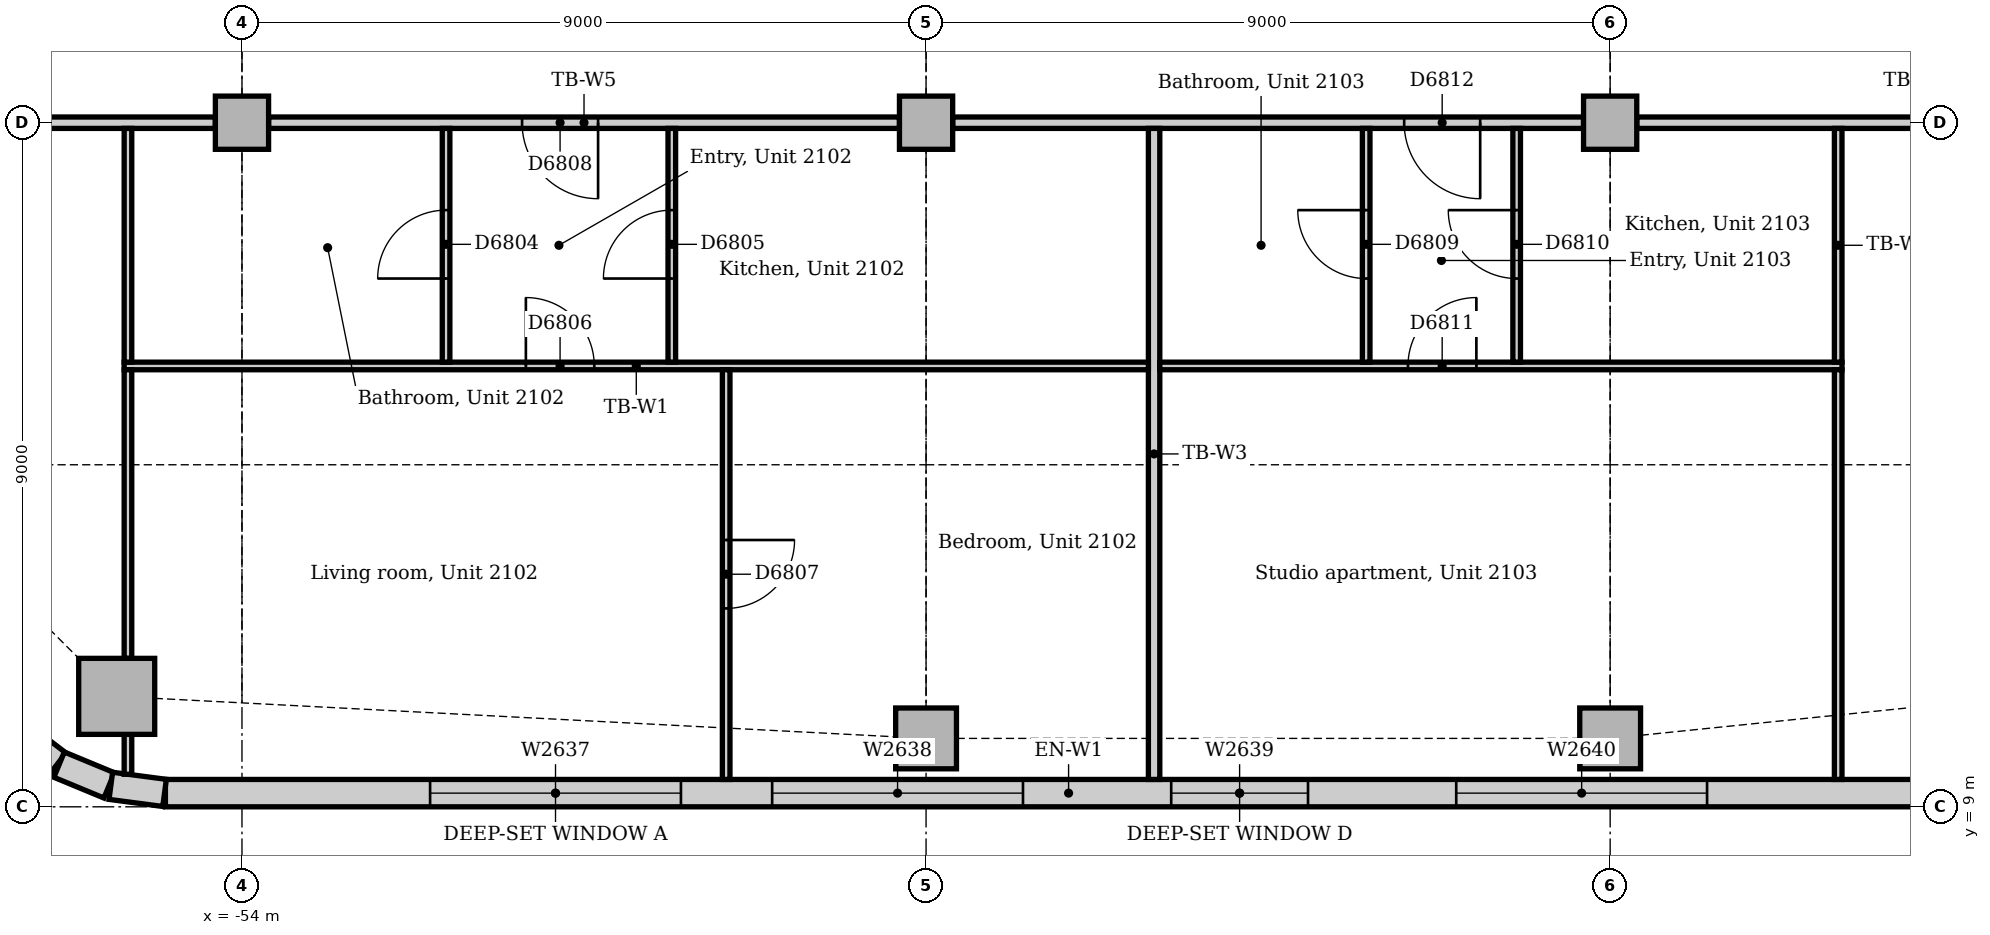
"""IFC4 building model, lengths in metres.
Left out: names, types, materials, properties, quantities, classifications, styles, units other than length and angle.
Written with IfcOpenShell. Run it as: python <this file> out.ifc"""

import sys

from ifc_helpers import new_model, si_unit, direction, frame, frame_2d, origin, origin_2d, place, context, subcontext, project, spatial, rectangle, extrude, element, fill, save


model = new_model("IFC4")
c1 = context("Model", 3, precision=1e-05, world=origin(), true_north=direction((0.0, 1.0)))
c2 = subcontext(c1, "Body", "Model", "MODEL_VIEW")
j1 = project(units=[si_unit("LENGTHUNIT", "METRE"), si_unit("PLANEANGLEUNIT", "RADIAN")], contexts=[c1])
p1 = place(None, origin())
s1 = spatial("IfcSite", under=j1, at=p1, CompositionType="ELEMENT")
p2 = place(p1, origin())
s2 = spatial("IfcBuilding", under=s1, at=p2, CompositionType="ELEMENT")
p3 = place(p2, frame((0.0, 0.0, 91.0)))
s3 = spatial("IfcBuildingStorey", under=s2, at=p3, CompositionType="ELEMENT", Elevation=91.0)
p4 = place(p3, frame((-55.648, 10.453, 0.0), z_axis=(0.0, 0.0, 1.0), x_axis=(1.0, 0.0, 0.0)))
e1 = element("IfcColumn", 1, at=p4, inside=s3, PredefinedType="COLUMN", context=c2, shape_type="SweptSolid", body=[
    extrude(rectangle(XDim=1.0, YDim=1.0, at=origin_2d()), origin(), (0.0, 0.0, 1.0), 3.7),
])
for number, where, z_axis, x_axis in (
    (2, (-45.0, 9.9, 0.0), (0.0, 0.0, 1.0), (1.0, 0.0, 0.0)),
    (3, (-36.0, 9.9, 0.0), (0.0, 0.0, 1.0), (1.0, 0.0, 0.0)),
):
    element("IfcColumn", number, at=place(p3, frame(where, z_axis=z_axis, x_axis=x_axis)), inside=s3, PredefinedType="COLUMN", context=c2, shape_type="SweptSolid", body=[
        extrude(rectangle(XDim=0.8, YDim=0.8, at=origin_2d()), origin(), (0.0, 0.0, 1.0), 3.7),
    ])
for number, where, z_axis, x_axis in (
    (4, (-54.0, 18.0, 0.0), (0.0, 0.0, 1.0), (1.0, 0.0, 0.0)),
    (5, (-45.0, 18.0, 0.0), (0.0, 0.0, 1.0), (1.0, 0.0, 0.0)),
    (6, (-36.0, 18.0, 0.0), (0.0, 0.0, 1.0), (1.0, 0.0, 0.0)),
):
    element("IfcColumn", number, at=place(p3, frame(where, z_axis=z_axis, x_axis=x_axis)), inside=s3, PredefinedType="COLUMN", context=c2, shape_type="SweptSolid", body=[
        extrude(rectangle(XDim=0.7, YDim=0.7, at=origin_2d()), origin(), (0.0, 0.0, 1.0), 3.7),
    ])
p5 = place(p3, frame((-55.007, 9.18, 0.0), z_axis=(0.0, 0.0, 1.0), x_axis=(1.0, 0.0, 0.0)))
e7 = element("IfcWall", 7, at=p5, inside=s3, PredefinedType="STANDARD", context=c2, shape_type="SweptSolid", body=[
    extrude(rectangle(XDim=23.765, YDim=0.36, at=frame_2d((11.882, 0.0))), origin(), (0.0, 0.0, 1.0), 3.7),
])
p6 = place(p5, frame((3.482, 0.0, 0.9)))
e8 = element("IfcOpeningElement", 8, at=p6, cuts=e7, PredefinedType="OPENING", context=c2, shape_type="SweptSolid", body=[
    extrude(rectangle(XDim=3.3, YDim=1.6, at=frame_2d((1.65, 0.8))), frame((0.0, 0.19, 0.0), z_axis=(0.0, -1.0, 0.0), x_axis=(1.0, 0.0, 0.0)), (0.0, 0.0, 1.0), 0.38),
])
p7 = place(p5, frame((7.982, 0.0, 0.9)))
e9 = element("IfcOpeningElement", 9, at=p7, cuts=e7, PredefinedType="OPENING", context=c2, shape_type="SweptSolid", body=[
    extrude(rectangle(XDim=3.3, YDim=1.6, at=frame_2d((1.65, 0.8))), frame((0.0, 0.19, 0.0), z_axis=(0.0, -1.0, 0.0), x_axis=(1.0, 0.0, 0.0)), (0.0, 0.0, 1.0), 0.38),
])
p8 = place(p5, frame((13.232, 0.0, 0.9)))
e10 = element("IfcOpeningElement", 10, at=p8, cuts=e7, PredefinedType="OPENING", context=c2, shape_type="SweptSolid", body=[
    extrude(rectangle(XDim=1.8, YDim=1.6, at=frame_2d((0.9, 0.8))), frame((0.0, 0.19, 0.0), z_axis=(0.0, -1.0, 0.0), x_axis=(1.0, 0.0, 0.0)), (0.0, 0.0, 1.0), 0.38),
])
p9 = place(p5, frame((16.982, 0.0, 0.9)))
e11 = element("IfcOpeningElement", 11, at=p9, cuts=e7, PredefinedType="OPENING", context=c2, shape_type="SweptSolid", body=[
    extrude(rectangle(XDim=3.3, YDim=1.6, at=frame_2d((1.65, 0.8))), frame((0.0, 0.19, 0.0), z_axis=(0.0, -1.0, 0.0), x_axis=(1.0, 0.0, 0.0)), (0.0, 0.0, 1.0), 0.38),
])
p10 = place(p3, frame((-56.991, 10.0, 0.0), z_axis=(0.0, 0.0, 1.0), x_axis=(0.793321924995, -0.608802368033, 0.0)))
e12 = element("IfcWall", 12, at=p10, inside=s3, PredefinedType="STANDARD", context=c2, shape_type="SweptSolid", body=[
    extrude(rectangle(XDim=0.713, YDim=0.36, at=frame_2d((0.357, 0.0))), origin(), (0.0, 0.0, 1.0), 3.7),
])
for number, where, z_axis, x_axis in (
    (13, (-56.406, 9.555, 0.0), (0.0, 0.0, 1.0), (0.924, -0.383, 0.0)),
    (14, (-55.726, 9.276, 0.0), (0.0, 0.0, 1.0), (0.991, -0.131, 0.0)),
):
    element("IfcWall", number, at=place(p3, frame(where, z_axis=z_axis, x_axis=x_axis)), inside=s3, PredefinedType="STANDARD", context=c2, shape_type="SweptSolid", body=[
        extrude(rectangle(XDim=0.713, YDim=0.36, at=frame_2d((0.356, 0.0))), origin(), (0.0, 0.0, 1.0), 3.7),
    ])
p11 = place(p3, frame((-35.65, 18.0, 0.0), z_axis=(0.0, 0.0, 1.0), x_axis=(1.0, 0.0, 0.0)))
e15 = element("IfcWall", 15, at=p11, inside=s3, PredefinedType="PARTITIONING", context=c2, shape_type="SweptSolid", body=[
    extrude(rectangle(XDim=7.35, YDim=0.15, at=frame_2d((3.675, 0.0))), origin(), (0.0, 0.0, 1.0), 3.008),
])
p12 = place(p11, frame((4.45, 0.0, 0.0)))
e16 = element("IfcOpeningElement", 16, at=p12, cuts=e15, PredefinedType="OPENING", context=c2, shape_type="SweptSolid", body=[
    extrude(rectangle(XDim=0.9, YDim=2.1, at=frame_2d((0.45, 1.05))), frame((0.0, 0.085, 0.0), z_axis=(0.0, -1.0, 0.0), x_axis=(1.0, 0.0, 0.0)), (0.0, 0.0, 1.0), 0.17),
])
p13 = place(p3, frame((-44.65, 18.0, 0.0), z_axis=(0.0, 0.0, 1.0), x_axis=(1.0, 0.0, 0.0)))
e17 = element("IfcWall", 17, at=p13, inside=s3, PredefinedType="PARTITIONING", context=c2, shape_type="SweptSolid", body=[
    extrude(rectangle(XDim=8.3, YDim=0.15, at=frame_2d((4.15, 0.0))), origin(), (0.0, 0.0, 1.0), 3.008),
])
p14 = place(p13, frame((5.94, 0.0, 0.0)))
e18 = element("IfcOpeningElement", 18, at=p14, cuts=e17, PredefinedType="OPENING", context=c2, shape_type="SweptSolid", body=[
    extrude(rectangle(XDim=1.0, YDim=2.1, at=frame_2d((0.5, 1.05))), frame((0.0, 0.085, 0.0), z_axis=(0.0, -1.0, 0.0), x_axis=(1.0, 0.0, 0.0)), (0.0, 0.0, 1.0), 0.17),
])
p15 = place(p3, frame((-53.65, 18.0, 0.0), z_axis=(0.0, 0.0, 1.0), x_axis=(1.0, 0.0, 0.0)))
e19 = element("IfcWall", 19, at=p15, inside=s3, PredefinedType="PARTITIONING", context=c2, shape_type="SweptSolid", body=[
    extrude(rectangle(XDim=8.3, YDim=0.15, at=frame_2d((4.15, 0.0))), origin(), (0.0, 0.0, 1.0), 3.008),
])
p16 = place(p15, frame((3.335, 0.0, 0.0)))
e20 = element("IfcOpeningElement", 20, at=p16, cuts=e19, PredefinedType="OPENING", context=c2, shape_type="SweptSolid", body=[
    extrude(rectangle(XDim=1.0, YDim=2.1, at=frame_2d((0.5, 1.05))), frame((0.0, 0.085, 0.0), z_axis=(0.0, -1.0, 0.0), x_axis=(1.0, 0.0, 0.0)), (0.0, 0.0, 1.0), 0.17),
])
p17 = place(p3, frame((-64.596, 18.0, 0.0), z_axis=(0.0, 0.0, 1.0), x_axis=(1.0, 0.0, 0.0)))
e21 = element("IfcWall", 21, at=p17, inside=s3, PredefinedType="PARTITIONING", context=c2, shape_type="SweptSolid", body=[
    extrude(rectangle(XDim=10.246, YDim=0.15, at=frame_2d((5.123, 0.0))), origin(), (0.0, 0.0, 1.0), 3.008),
])
p18 = place(p17, frame((4.15, 0.0, 0.0)))
e22 = element("IfcOpeningElement", 22, at=p18, cuts=e21, PredefinedType="OPENING", context=c2, shape_type="SweptSolid", body=[
    extrude(rectangle(XDim=0.9, YDim=2.1, at=frame_2d((0.45, 1.05))), frame((0.0, 0.085, 0.0), z_axis=(0.0, -1.0, 0.0), x_axis=(1.0, 0.0, 0.0)), (0.0, 0.0, 1.0), 0.17),
])
p19 = place(p3, frame((-42.0, 9.36, 0.0), z_axis=(0.0, 0.0, 1.0), x_axis=(0.0, 1.0, 0.0)))
e23 = element("IfcWall", 23, at=p19, inside=s3, PredefinedType="PARTITIONING", context=c2, shape_type="SweptSolid", body=[
    extrude(rectangle(XDim=8.565, YDim=0.15, at=frame_2d((4.282, 0.0))), origin(), (0.0, 0.0, 1.0), 3.7),
])
p20 = place(p3, frame((-55.55, 14.8, 0.0), z_axis=(0.0, 0.0, 1.0), x_axis=(1.0, 0.0, 0.0)))
e24 = element("IfcWall", 24, at=p20, inside=s3, PredefinedType="PARTITIONING", context=c2, shape_type="SweptSolid", body=[
    extrude(rectangle(XDim=13.475, YDim=0.1, at=frame_2d((6.737, 0.0))), origin(), (0.0, 0.0, 1.0), 3.7),
])
p21 = place(p20, frame((5.285, 0.0, 0.0)))
e25 = element("IfcOpeningElement", 25, at=p21, cuts=e24, PredefinedType="OPENING", context=c2, shape_type="SweptSolid", body=[
    extrude(rectangle(XDim=0.9, YDim=2.1, at=frame_2d((0.45, 1.05))), frame((0.0, 0.06, 0.0), z_axis=(0.0, -1.0, 0.0), x_axis=(1.0, 0.0, 0.0)), (0.0, 0.0, 1.0), 0.12),
])
p22 = place(p3, frame((-41.925, 14.8, 0.0), z_axis=(0.0, 0.0, 1.0), x_axis=(1.0, 0.0, 0.0)))
e26 = element("IfcWall", 26, at=p22, inside=s3, PredefinedType="PARTITIONING", context=c2, shape_type="SweptSolid", body=[
    extrude(rectangle(XDim=8.975, YDim=0.1, at=frame_2d((4.487, 0.0))), origin(), (0.0, 0.0, 1.0), 3.7),
])
p23 = place(p22, frame((3.265, 0.0, 0.0)))
e27 = element("IfcOpeningElement", 27, at=p23, cuts=e26, PredefinedType="OPENING", context=c2, shape_type="SweptSolid", body=[
    extrude(rectangle(XDim=0.9, YDim=2.1, at=frame_2d((0.45, 1.05))), frame((0.0, 0.06, 0.0), z_axis=(0.0, -1.0, 0.0), x_axis=(1.0, 0.0, 0.0)), (0.0, 0.0, 1.0), 0.12),
])
p24 = place(p3, frame((-33.0, 14.85, 0.0), z_axis=(0.0, 0.0, 1.0), x_axis=(0.0, 1.0, 0.0)))
e28 = element("IfcWall", 28, at=p24, inside=s3, PredefinedType="PARTITIONING", context=c2, shape_type="SweptSolid", body=[
    extrude(rectangle(XDim=3.075, YDim=0.1, at=frame_2d((1.538, 0.0))), origin(), (0.0, 0.0, 1.0), 3.7),
])
p25 = place(p3, frame((-33.0, 9.36, 0.0), z_axis=(0.0, 0.0, 1.0), x_axis=(0.0, 1.0, 0.0)))
e29 = element("IfcWall", 29, at=p25, inside=s3, PredefinedType="PARTITIONING", context=c2, shape_type="SweptSolid", body=[
    extrude(rectangle(XDim=5.39, YDim=0.1, at=frame_2d((2.695, 0.0))), origin(), (0.0, 0.0, 1.0), 3.7),
])
p26 = place(p3, frame((-55.5, 14.85, 0.0), z_axis=(0.0, 0.0, 1.0), x_axis=(0.0, 1.0, 0.0)))
e30 = element("IfcWall", 30, at=p26, inside=s3, PredefinedType="PARTITIONING", context=c2, shape_type="SweptSolid", body=[
    extrude(rectangle(XDim=3.075, YDim=0.1, at=frame_2d((1.538, 0.0))), origin(), (0.0, 0.0, 1.0), 3.7),
])
p27 = place(p3, frame((-55.5, 10.953, 0.0), z_axis=(0.0, 0.0, 1.0), x_axis=(0.0, 1.0, 0.0)))
e31 = element("IfcWall", 31, at=p27, inside=s3, PredefinedType="PARTITIONING", context=c2, shape_type="SweptSolid", body=[
    extrude(rectangle(XDim=3.797, YDim=0.1, at=frame_2d((1.898, 0.0))), origin(), (0.0, 0.0, 1.0), 3.7),
])
p28 = place(p3, frame((-55.5, 9.428, 0.0), z_axis=(0.0, 0.0, 1.0), x_axis=(0.0, 1.0, 0.0)))
e32 = element("IfcWall", 32, at=p28, inside=s3, PredefinedType="PARTITIONING", context=c2, shape_type="SweptSolid", body=[
    extrude(rectangle(XDim=0.525, YDim=0.1, at=frame_2d((0.263, 0.0))), origin(), (0.0, 0.0, 1.0), 3.7),
])
p29 = place(p3, frame((-47.63, 9.36, 0.0), z_axis=(0.0, 0.0, 1.0), x_axis=(0.0, 1.0, 0.0)))
e33 = element("IfcWall", 33, at=p29, inside=s3, PredefinedType="PARTITIONING", context=c2, shape_type="SweptSolid", body=[
    extrude(rectangle(XDim=5.39, YDim=0.1, at=frame_2d((2.695, 0.0))), origin(), (0.0, 0.0, 1.0), 3.7),
])
p30 = place(p29, frame((2.25, 0.0, 0.0)))
e34 = element("IfcOpeningElement", 34, at=p30, cuts=e33, PredefinedType="OPENING", context=c2, shape_type="SweptSolid", body=[
    extrude(rectangle(XDim=0.9, YDim=2.1, at=frame_2d((0.45, 1.05))), frame((0.0, 0.06, 0.0), z_axis=(0.0, -1.0, 0.0), x_axis=(1.0, 0.0, 0.0)), (0.0, 0.0, 1.0), 0.12),
])
p31 = place(p3, frame((-51.315, 14.85, 0.0), z_axis=(0.0, 0.0, 1.0), x_axis=(0.0, 1.0, 0.0)))
e35 = element("IfcWall", 35, at=p31, inside=s3, PredefinedType="PARTITIONING", context=c2, shape_type="SweptSolid", body=[
    extrude(rectangle(XDim=3.075, YDim=0.1, at=frame_2d((1.538, 0.0))), origin(), (0.0, 0.0, 1.0), 3.7),
])
p32 = place(p31, frame((1.1, 0.0, 0.0)))
e36 = element("IfcOpeningElement", 36, at=p32, cuts=e35, PredefinedType="OPENING", context=c2, shape_type="SweptSolid", body=[
    extrude(rectangle(XDim=0.9, YDim=2.1, at=frame_2d((0.45, 1.05))), frame((0.0, 0.06, 0.0), z_axis=(0.0, -1.0, 0.0), x_axis=(1.0, 0.0, 0.0)), (0.0, 0.0, 1.0), 0.12),
])
p33 = place(p3, frame((-48.345, 14.85, 0.0), z_axis=(0.0, 0.0, 1.0), x_axis=(0.0, 1.0, 0.0)))
e37 = element("IfcWall", 37, at=p33, inside=s3, PredefinedType="PARTITIONING", context=c2, shape_type="SweptSolid", body=[
    extrude(rectangle(XDim=3.075, YDim=0.1, at=frame_2d((1.538, 0.0))), origin(), (0.0, 0.0, 1.0), 3.7),
])
p34 = place(p33, frame((1.1, 0.0, 0.0)))
e38 = element("IfcOpeningElement", 38, at=p34, cuts=e37, PredefinedType="OPENING", context=c2, shape_type="SweptSolid", body=[
    extrude(rectangle(XDim=0.9, YDim=2.1, at=frame_2d((0.45, 1.05))), frame((0.0, 0.06, 0.0), z_axis=(0.0, -1.0, 0.0), x_axis=(1.0, 0.0, 0.0)), (0.0, 0.0, 1.0), 0.12),
])
p35 = place(p3, frame((-39.21, 14.85, 0.0), z_axis=(0.0, 0.0, 1.0), x_axis=(0.0, 1.0, 0.0)))
e39 = element("IfcWall", 39, at=p35, inside=s3, PredefinedType="PARTITIONING", context=c2, shape_type="SweptSolid", body=[
    extrude(rectangle(XDim=3.075, YDim=0.1, at=frame_2d((1.538, 0.0))), origin(), (0.0, 0.0, 1.0), 3.7),
])
p36 = place(p35, frame((1.1, 0.0, 0.0)))
e40 = element("IfcOpeningElement", 40, at=p36, cuts=e39, PredefinedType="OPENING", context=c2, shape_type="SweptSolid", body=[
    extrude(rectangle(XDim=0.9, YDim=2.1, at=frame_2d((0.45, 1.05))), frame((0.0, 0.06, 0.0), z_axis=(0.0, -1.0, 0.0), x_axis=(1.0, 0.0, 0.0)), (0.0, 0.0, 1.0), 0.12),
])
p37 = place(p3, frame((-37.23, 14.85, 0.0), z_axis=(0.0, 0.0, 1.0), x_axis=(0.0, 1.0, 0.0)))
e41 = element("IfcWall", 41, at=p37, inside=s3, PredefinedType="PARTITIONING", context=c2, shape_type="SweptSolid", body=[
    extrude(rectangle(XDim=3.075, YDim=0.1, at=frame_2d((1.538, 0.0))), origin(), (0.0, 0.0, 1.0), 3.7),
])
p38 = place(p37, frame((1.1, 0.0, 0.0)))
e42 = element("IfcOpeningElement", 42, at=p38, cuts=e41, PredefinedType="OPENING", context=c2, shape_type="SweptSolid", body=[
    extrude(rectangle(XDim=0.9, YDim=2.1, at=frame_2d((0.45, 1.05))), frame((0.0, 0.06, 0.0), z_axis=(0.0, -1.0, 0.0), x_axis=(1.0, 0.0, 0.0)), (0.0, 0.0, 1.0), 0.12),
])
p39 = place(p6, origin())
e43 = element("IfcWindow", 43, at=p39, inside=s3, PartitioningType="SINGLE_PANEL", PredefinedType="WINDOW", context=c2, shape_type="SweptSolid", body=[
    extrude(rectangle(XDim=3.3, YDim=1.6, at=frame_2d((1.65, 0.8))), frame((0.0, 0.13, 0.0), z_axis=(0.0, -1.0, 0.0), x_axis=(1.0, 0.0, 0.0)), (0.0, 0.0, 1.0), 0.06),
])
fill(e8, e43)
p40 = place(p7, origin())
e44 = element("IfcWindow", 44, at=p40, inside=s3, PartitioningType="SINGLE_PANEL", PredefinedType="WINDOW", context=c2, shape_type="SweptSolid", body=[
    extrude(rectangle(XDim=3.3, YDim=1.6, at=frame_2d((1.65, 0.8))), frame((0.0, 0.13, 0.0), z_axis=(0.0, -1.0, 0.0), x_axis=(1.0, 0.0, 0.0)), (0.0, 0.0, 1.0), 0.06),
])
fill(e9, e44)
p41 = place(p8, origin())
e45 = element("IfcWindow", 45, at=p41, inside=s3, PartitioningType="SINGLE_PANEL", PredefinedType="WINDOW", context=c2, shape_type="SweptSolid", body=[
    extrude(rectangle(XDim=1.8, YDim=1.6, at=frame_2d((0.9, 0.8))), frame((0.0, 0.13, 0.0), z_axis=(0.0, -1.0, 0.0), x_axis=(1.0, 0.0, 0.0)), (0.0, 0.0, 1.0), 0.06),
])
fill(e10, e45)
p42 = place(p9, origin())
e46 = element("IfcWindow", 46, at=p42, inside=s3, PartitioningType="SINGLE_PANEL", PredefinedType="WINDOW", context=c2, shape_type="SweptSolid", body=[
    extrude(rectangle(XDim=3.3, YDim=1.6, at=frame_2d((1.65, 0.8))), frame((0.0, 0.13, 0.0), z_axis=(0.0, -1.0, 0.0), x_axis=(1.0, 0.0, 0.0)), (0.0, 0.0, 1.0), 0.06),
])
fill(e11, e46)
p43 = place(p32, origin())
e47 = element("IfcDoor", 47, at=p43, inside=s3, OperationType="SINGLE_SWING_LEFT", PredefinedType="DOOR", context=c2, shape_type="SweptSolid", body=[
    extrude(rectangle(XDim=0.9, YDim=2.1, at=frame_2d((0.45, 1.05))), frame((0.0, 0.025, 0.0), z_axis=(0.0, -1.0, 0.0), x_axis=(1.0, 0.0, 0.0)), (0.0, 0.0, 1.0), 0.05),
])
fill(e36, e47)
p44 = place(p34, origin())
e48 = element("IfcDoor", 48, at=p44, inside=s3, OperationType="SINGLE_SWING_LEFT", PredefinedType="DOOR", context=c2, shape_type="SweptSolid", body=[
    extrude(rectangle(XDim=0.9, YDim=2.1, at=frame_2d((0.45, 1.05))), frame((0.0, 0.025, 0.0), z_axis=(0.0, -1.0, 0.0), x_axis=(1.0, 0.0, 0.0)), (0.0, 0.0, 1.0), 0.05),
])
fill(e38, e48)
p45 = place(p21, origin())
e49 = element("IfcDoor", 49, at=p45, inside=s3, OperationType="SINGLE_SWING_LEFT", PredefinedType="DOOR", context=c2, shape_type="SweptSolid", body=[
    extrude(rectangle(XDim=0.9, YDim=2.1, at=frame_2d((0.45, 1.05))), frame((0.0, 0.025, 0.0), z_axis=(0.0, -1.0, 0.0), x_axis=(1.0, 0.0, 0.0)), (0.0, 0.0, 1.0), 0.05),
])
fill(e25, e49)
p46 = place(p30, frame((0.9, 0.0, 0.0), z_axis=(0.0, 0.0, 1.0), x_axis=(-1.0, 0.0, 0.0)))
e50 = element("IfcDoor", 50, at=p46, inside=s3, OperationType="SINGLE_SWING_LEFT", PredefinedType="DOOR", context=c2, shape_type="SweptSolid", body=[
    extrude(rectangle(XDim=0.9, YDim=2.1, at=frame_2d((0.45, 1.05))), frame((0.0, 0.025, 0.0), z_axis=(0.0, -1.0, 0.0), x_axis=(1.0, 0.0, 0.0)), (0.0, 0.0, 1.0), 0.05),
])
fill(e34, e50)
p47 = place(p16, frame((1.0, 0.0, 0.0), z_axis=(0.0, 0.0, 1.0), x_axis=(-1.0, 0.0, 0.0)))
e51 = element("IfcDoor", 51, at=p47, inside=s3, OperationType="SINGLE_SWING_LEFT", PredefinedType="DOOR", context=c2, shape_type="SweptSolid", body=[
    extrude(rectangle(XDim=1.0, YDim=2.1, at=frame_2d((0.5, 1.05))), frame((0.0, 0.025, 0.0), z_axis=(0.0, -1.0, 0.0), x_axis=(1.0, 0.0, 0.0)), (0.0, 0.0, 1.0), 0.05),
])
fill(e20, e51)
p48 = place(p36, origin())
e52 = element("IfcDoor", 52, at=p48, inside=s3, OperationType="SINGLE_SWING_RIGHT", PredefinedType="DOOR", context=c2, shape_type="SweptSolid", body=[
    extrude(rectangle(XDim=0.9, YDim=2.1, at=frame_2d((0.45, 1.05))), frame((0.0, 0.025, 0.0), z_axis=(0.0, -1.0, 0.0), x_axis=(1.0, 0.0, 0.0)), (0.0, 0.0, 1.0), 0.05),
])
fill(e40, e52)
p49 = place(p38, origin())
e53 = element("IfcDoor", 53, at=p49, inside=s3, OperationType="SINGLE_SWING_RIGHT", PredefinedType="DOOR", context=c2, shape_type="SweptSolid", body=[
    extrude(rectangle(XDim=0.9, YDim=2.1, at=frame_2d((0.45, 1.05))), frame((0.0, 0.025, 0.0), z_axis=(0.0, -1.0, 0.0), x_axis=(1.0, 0.0, 0.0)), (0.0, 0.0, 1.0), 0.05),
])
fill(e42, e53)
p50 = place(p23, origin())
e54 = element("IfcDoor", 54, at=p50, inside=s3, OperationType="SINGLE_SWING_RIGHT", PredefinedType="DOOR", context=c2, shape_type="SweptSolid", body=[
    extrude(rectangle(XDim=0.9, YDim=2.1, at=frame_2d((0.45, 1.05))), frame((0.0, 0.025, 0.0), z_axis=(0.0, -1.0, 0.0), x_axis=(1.0, 0.0, 0.0)), (0.0, 0.0, 1.0), 0.05),
])
fill(e27, e54)
p51 = place(p14, frame((1.0, 0.0, 0.0), z_axis=(0.0, 0.0, 1.0), x_axis=(-1.0, 0.0, 0.0)))
e55 = element("IfcDoor", 55, at=p51, inside=s3, OperationType="SINGLE_SWING_LEFT", PredefinedType="DOOR", context=c2, shape_type="SweptSolid", body=[
    extrude(rectangle(XDim=1.0, YDim=2.1, at=frame_2d((0.5, 1.05))), frame((0.0, 0.025, 0.0), z_axis=(0.0, -1.0, 0.0), x_axis=(1.0, 0.0, 0.0)), (0.0, 0.0, 1.0), 0.05),
])
fill(e18, e55)
save(model, sys.argv[1])
